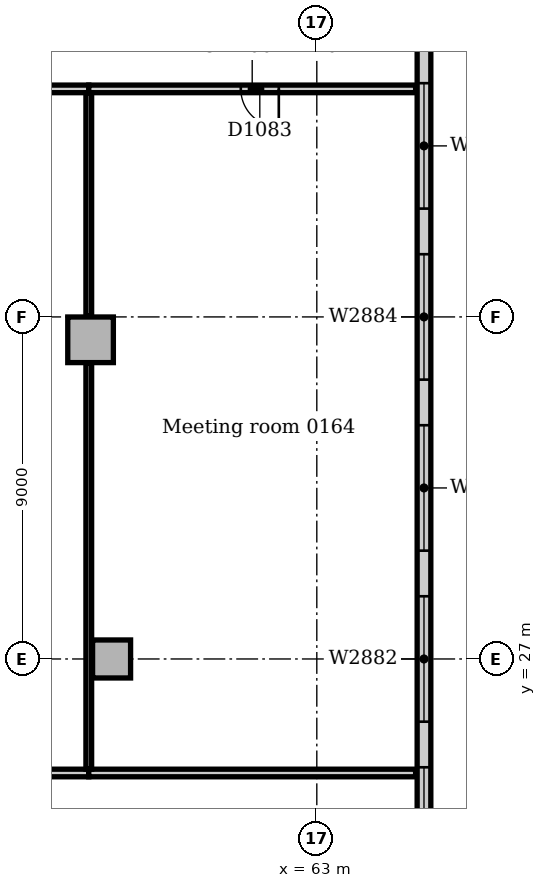
"""IFC4 building model, lengths in metres.
Left out: names, types, materials, properties, quantities, classifications, styles, units other than length and angle.
Written with IfcOpenShell. Run it as: python <this file> out.ifc"""

import sys

from ifc_helpers import new_model, si_unit, direction, frame, frame_2d, origin, origin_2d, place, context, subcontext, project, spatial, rectangle, extrude, element, fill, save


model = new_model("IFC4")
c1 = context("Model", 3, precision=1e-05, world=origin(), true_north=direction((0.0, 1.0)))
c2 = subcontext(c1, "Body", "Model", "MODEL_VIEW")
j1 = project(units=[si_unit("LENGTHUNIT", "METRE"), si_unit("PLANEANGLEUNIT", "RADIAN")], contexts=[c1])
p1 = place(None, origin())
s1 = spatial("IfcSite", under=j1, at=p1, CompositionType="ELEMENT")
p2 = place(p1, origin())
s2 = spatial("IfcBuilding", under=s1, at=p2, CompositionType="ELEMENT")
p3 = place(p2, frame((0.0, 0.0, 6.0)))
s3 = spatial("IfcBuildingStorey", under=s2, at=p3, CompositionType="ELEMENT", Elevation=6.0)
p4 = place(p3, frame((57.047, 35.398, 0.0), z_axis=(0.0, 0.0, 1.0), x_axis=(1.0, 0.0, 0.0)))
e1 = element("IfcColumn", 1, at=p4, inside=s3, PredefinedType="COLUMN", context=c2, shape_type="SweptSolid", body=[
    extrude(rectangle(XDim=1.2, YDim=1.2, at=origin_2d()), origin(), (0.0, 0.0, 1.0), 4.7),
])
p5 = place(p3, frame((57.6, 27.0, 0.0), z_axis=(0.0, 0.0, 1.0), x_axis=(1.0, 0.0, 0.0)))
e2 = element("IfcColumn", 2, at=p5, inside=s3, PredefinedType="COLUMN", context=c2, shape_type="SweptSolid", body=[
    extrude(rectangle(XDim=1.0, YDim=1.0, at=origin_2d()), origin(), (0.0, 0.0, 1.0), 4.7),
])
p6 = place(p3, frame((65.82, -9.0, 0.0), z_axis=(0.0, 0.0, 1.0), x_axis=(0.0, 1.0, 0.0)))
e3 = element("IfcWall", 3, at=p6, inside=s3, PredefinedType="STANDARD", context=c2, shape_type="SweptSolid", body=[
    extrude(rectangle(XDim=63.0, YDim=0.36, at=frame_2d((31.5, 0.0))), origin(), (0.0, 0.0, 1.0), 4.7),
])
p7 = place(p6, frame((2.85, 0.0, 0.9)))
e4 = element("IfcOpeningElement", 4, at=p7, cuts=e3, PredefinedType="OPENING", context=c2, shape_type="SweptSolid", body=[
    extrude(rectangle(XDim=3.3, YDim=2.4, at=frame_2d((1.65, 1.2))), frame((0.0, 0.19, 0.0), z_axis=(0.0, -1.0, 0.0), x_axis=(1.0, 0.0, 0.0)), (0.0, 0.0, 1.0), 0.38),
])
p8 = place(p6, frame((7.35, 0.0, 0.9)))
e5 = element("IfcOpeningElement", 5, at=p8, cuts=e3, PredefinedType="OPENING", context=c2, shape_type="SweptSolid", body=[
    extrude(rectangle(XDim=3.3, YDim=2.4, at=frame_2d((1.65, 1.2))), frame((0.0, 0.19, 0.0), z_axis=(0.0, -1.0, 0.0), x_axis=(1.0, 0.0, 0.0)), (0.0, 0.0, 1.0), 0.38),
])
p9 = place(p6, frame((11.85, 0.0, 0.9)))
e6 = element("IfcOpeningElement", 6, at=p9, cuts=e3, PredefinedType="OPENING", context=c2, shape_type="SweptSolid", body=[
    extrude(rectangle(XDim=3.3, YDim=2.4, at=frame_2d((1.65, 1.2))), frame((0.0, 0.19, 0.0), z_axis=(0.0, -1.0, 0.0), x_axis=(1.0, 0.0, 0.0)), (0.0, 0.0, 1.0), 0.38),
])
p10 = place(p6, frame((16.35, 0.0, 0.9)))
e7 = element("IfcOpeningElement", 7, at=p10, cuts=e3, PredefinedType="OPENING", context=c2, shape_type="SweptSolid", body=[
    extrude(rectangle(XDim=3.3, YDim=2.4, at=frame_2d((1.65, 1.2))), frame((0.0, 0.19, 0.0), z_axis=(0.0, -1.0, 0.0), x_axis=(1.0, 0.0, 0.0)), (0.0, 0.0, 1.0), 0.38),
])
p11 = place(p6, frame((20.85, 0.0, 0.9)))
e8 = element("IfcOpeningElement", 8, at=p11, cuts=e3, PredefinedType="OPENING", context=c2, shape_type="SweptSolid", body=[
    extrude(rectangle(XDim=3.3, YDim=2.4, at=frame_2d((1.65, 1.2))), frame((0.0, 0.19, 0.0), z_axis=(0.0, -1.0, 0.0), x_axis=(1.0, 0.0, 0.0)), (0.0, 0.0, 1.0), 0.38),
])
p12 = place(p6, frame((25.35, 0.0, 0.9)))
e9 = element("IfcOpeningElement", 9, at=p12, cuts=e3, PredefinedType="OPENING", context=c2, shape_type="SweptSolid", body=[
    extrude(rectangle(XDim=3.3, YDim=2.4, at=frame_2d((1.65, 1.2))), frame((0.0, 0.19, 0.0), z_axis=(0.0, -1.0, 0.0), x_axis=(1.0, 0.0, 0.0)), (0.0, 0.0, 1.0), 0.38),
])
p13 = place(p6, frame((29.85, 0.0, 0.9)))
e10 = element("IfcOpeningElement", 10, at=p13, cuts=e3, PredefinedType="OPENING", context=c2, shape_type="SweptSolid", body=[
    extrude(rectangle(XDim=3.3, YDim=2.4, at=frame_2d((1.65, 1.2))), frame((0.0, 0.19, 0.0), z_axis=(0.0, -1.0, 0.0), x_axis=(1.0, 0.0, 0.0)), (0.0, 0.0, 1.0), 0.38),
])
p14 = place(p6, frame((34.35, 0.0, 0.9)))
e11 = element("IfcOpeningElement", 11, at=p14, cuts=e3, PredefinedType="OPENING", context=c2, shape_type="SweptSolid", body=[
    extrude(rectangle(XDim=3.3, YDim=2.4, at=frame_2d((1.65, 1.2))), frame((0.0, 0.19, 0.0), z_axis=(0.0, -1.0, 0.0), x_axis=(1.0, 0.0, 0.0)), (0.0, 0.0, 1.0), 0.38),
])
p15 = place(p6, frame((38.85, 0.0, 0.9)))
e12 = element("IfcOpeningElement", 12, at=p15, cuts=e3, PredefinedType="OPENING", context=c2, shape_type="SweptSolid", body=[
    extrude(rectangle(XDim=3.3, YDim=2.4, at=frame_2d((1.65, 1.2))), frame((0.0, 0.19, 0.0), z_axis=(0.0, -1.0, 0.0), x_axis=(1.0, 0.0, 0.0)), (0.0, 0.0, 1.0), 0.38),
])
p16 = place(p6, frame((43.35, 0.0, 0.9)))
e13 = element("IfcOpeningElement", 13, at=p16, cuts=e3, PredefinedType="OPENING", context=c2, shape_type="SweptSolid", body=[
    extrude(rectangle(XDim=3.3, YDim=2.4, at=frame_2d((1.65, 1.2))), frame((0.0, 0.19, 0.0), z_axis=(0.0, -1.0, 0.0), x_axis=(1.0, 0.0, 0.0)), (0.0, 0.0, 1.0), 0.38),
])
p17 = place(p6, frame((47.85, 0.0, 0.9)))
e14 = element("IfcOpeningElement", 14, at=p17, cuts=e3, PredefinedType="OPENING", context=c2, shape_type="SweptSolid", body=[
    extrude(rectangle(XDim=3.3, YDim=2.4, at=frame_2d((1.65, 1.2))), frame((0.0, 0.19, 0.0), z_axis=(0.0, -1.0, 0.0), x_axis=(1.0, 0.0, 0.0)), (0.0, 0.0, 1.0), 0.38),
])
p18 = place(p6, frame((52.35, 0.0, 0.9)))
e15 = element("IfcOpeningElement", 15, at=p18, cuts=e3, PredefinedType="OPENING", context=c2, shape_type="SweptSolid", body=[
    extrude(rectangle(XDim=3.3, YDim=2.4, at=frame_2d((1.65, 1.2))), frame((0.0, 0.19, 0.0), z_axis=(0.0, -1.0, 0.0), x_axis=(1.0, 0.0, 0.0)), (0.0, 0.0, 1.0), 0.38),
])
p19 = place(p6, frame((56.85, 0.0, 0.9)))
e16 = element("IfcOpeningElement", 16, at=p19, cuts=e3, PredefinedType="OPENING", context=c2, shape_type="SweptSolid", body=[
    extrude(rectangle(XDim=3.3, YDim=2.4, at=frame_2d((1.65, 1.2))), frame((0.0, 0.19, 0.0), z_axis=(0.0, -1.0, 0.0), x_axis=(1.0, 0.0, 0.0)), (0.0, 0.0, 1.0), 0.38),
])
p20 = place(p3, frame((48.0, 42.0, 0.0), z_axis=(0.0, 0.0, 1.0), x_axis=(1.0, 0.0, 0.0)))
e17 = element("IfcWall", 17, at=p20, inside=s3, PredefinedType="PARTITIONING", context=c2, shape_type="SweptSolid", body=[
    extrude(rectangle(XDim=9.0, YDim=0.2, at=frame_2d((4.5, 0.0))), origin(), (0.0, 0.0, 1.0), 4.7),
])
p21 = place(p20, frame((4.0, 0.0, 0.0)))
e18 = element("IfcOpeningElement", 18, at=p21, cuts=e17, PredefinedType="OPENING", context=c2, shape_type="SweptSolid", body=[
    extrude(rectangle(XDim=1.0, YDim=2.1, at=frame_2d((0.5, 1.05))), frame((0.0, 0.11, 0.0), z_axis=(0.0, -1.0, 0.0), x_axis=(1.0, 0.0, 0.0)), (0.0, 0.0, 1.0), 0.22),
])
p22 = place(p3, frame((57.0, 42.0, 0.0), z_axis=(0.0, 0.0, 1.0), x_axis=(1.0, 0.0, 0.0)))
e19 = element("IfcWall", 19, at=p22, inside=s3, PredefinedType="PARTITIONING", context=c2, shape_type="SweptSolid", body=[
    extrude(rectangle(XDim=8.6, YDim=0.2, at=frame_2d((4.3, 0.0))), origin(), (0.0, 0.0, 1.0), 4.7),
])
p23 = place(p22, frame((4.0, 0.0, 0.0)))
e20 = element("IfcOpeningElement", 20, at=p23, cuts=e19, PredefinedType="OPENING", context=c2, shape_type="SweptSolid", body=[
    extrude(rectangle(XDim=1.0, YDim=2.1, at=frame_2d((0.5, 1.05))), frame((0.0, 0.11, 0.0), z_axis=(0.0, -1.0, 0.0), x_axis=(1.0, 0.0, 0.0)), (0.0, 0.0, 1.0), 0.22),
])
p24 = place(p3, frame((48.0, 24.0, 0.0), z_axis=(0.0, 0.0, 1.0), x_axis=(1.0, 0.0, 0.0)))
e21 = element("IfcWall", 21, at=p24, inside=s3, PredefinedType="PARTITIONING", context=c2, shape_type="SweptSolid", body=[
    extrude(rectangle(XDim=9.0, YDim=0.2, at=frame_2d((4.5, 0.0))), origin(), (0.0, 0.0, 1.0), 4.7),
])
p25 = place(p3, frame((57.0, 24.0, 0.0), z_axis=(0.0, 0.0, 1.0), x_axis=(1.0, 0.0, 0.0)))
e22 = element("IfcWall", 22, at=p25, inside=s3, PredefinedType="PARTITIONING", context=c2, shape_type="SweptSolid", body=[
    extrude(rectangle(XDim=8.6, YDim=0.2, at=frame_2d((4.3, 0.0))), origin(), (0.0, 0.0, 1.0), 4.7),
])
p26 = place(p3, frame((57.0, 24.1, 0.0), z_axis=(0.0, 0.0, 1.0), x_axis=(0.0, 1.0, 0.0)))
e23 = element("IfcWall", 23, at=p26, inside=s3, PredefinedType="PARTITIONING", context=c2, shape_type="SweptSolid", body=[
    extrude(rectangle(XDim=10.678, YDim=0.15, at=frame_2d((5.339, 0.0))), origin(), (0.0, 0.0, 1.0), 4.7),
])
p27 = place(p3, frame((57.0, 36.018, 0.0), z_axis=(0.0, 0.0, 1.0), x_axis=(0.0, 1.0, 0.0)))
e24 = element("IfcWall", 24, at=p27, inside=s3, PredefinedType="PARTITIONING", context=c2, shape_type="SweptSolid", body=[
    extrude(rectangle(XDim=5.882, YDim=0.15, at=frame_2d((2.941, 0.0))), origin(), (0.0, 0.0, 1.0), 4.7),
])
p28 = place(p13, origin())
e25 = element("IfcWindow", 25, at=p28, inside=s3, PartitioningType="SINGLE_PANEL", PredefinedType="WINDOW", context=c2, shape_type="SweptSolid", body=[
    extrude(rectangle(XDim=3.3, YDim=2.4, at=frame_2d((1.65, 1.2))), frame((0.0, 0.13, 0.0), z_axis=(0.0, -1.0, 0.0), x_axis=(1.0, 0.0, 0.0)), (0.0, 0.0, 1.0), 0.06),
])
fill(e10, e25)
p29 = place(p14, origin())
e26 = element("IfcWindow", 26, at=p29, inside=s3, PartitioningType="SINGLE_PANEL", PredefinedType="WINDOW", context=c2, shape_type="SweptSolid", body=[
    extrude(rectangle(XDim=3.3, YDim=2.4, at=frame_2d((1.65, 1.2))), frame((0.0, 0.13, 0.0), z_axis=(0.0, -1.0, 0.0), x_axis=(1.0, 0.0, 0.0)), (0.0, 0.0, 1.0), 0.06),
])
fill(e11, e26)
p30 = place(p15, origin())
e27 = element("IfcWindow", 27, at=p30, inside=s3, PartitioningType="SINGLE_PANEL", PredefinedType="WINDOW", context=c2, shape_type="SweptSolid", body=[
    extrude(rectangle(XDim=3.3, YDim=2.4, at=frame_2d((1.65, 1.2))), frame((0.0, 0.13, 0.0), z_axis=(0.0, -1.0, 0.0), x_axis=(1.0, 0.0, 0.0)), (0.0, 0.0, 1.0), 0.06),
])
fill(e12, e27)
p31 = place(p16, origin())
e28 = element("IfcWindow", 28, at=p31, inside=s3, PartitioningType="SINGLE_PANEL", PredefinedType="WINDOW", context=c2, shape_type="SweptSolid", body=[
    extrude(rectangle(XDim=3.3, YDim=2.4, at=frame_2d((1.65, 1.2))), frame((0.0, 0.13, 0.0), z_axis=(0.0, -1.0, 0.0), x_axis=(1.0, 0.0, 0.0)), (0.0, 0.0, 1.0), 0.06),
])
fill(e13, e28)
p32 = place(p17, origin())
e29 = element("IfcWindow", 29, at=p32, inside=s3, PartitioningType="SINGLE_PANEL", PredefinedType="WINDOW", context=c2, shape_type="SweptSolid", body=[
    extrude(rectangle(XDim=3.3, YDim=2.4, at=frame_2d((1.65, 1.2))), frame((0.0, 0.13, 0.0), z_axis=(0.0, -1.0, 0.0), x_axis=(1.0, 0.0, 0.0)), (0.0, 0.0, 1.0), 0.06),
])
fill(e14, e29)
p33 = place(p23, frame((1.0, 0.0, 0.0), z_axis=(0.0, 0.0, 1.0), x_axis=(-1.0, 0.0, 0.0)))
e30 = element("IfcDoor", 30, at=p33, inside=s3, OperationType="SINGLE_SWING_LEFT", PredefinedType="DOOR", context=c2, shape_type="SweptSolid", body=[
    extrude(rectangle(XDim=1.0, YDim=2.1, at=frame_2d((0.5, 1.05))), frame((0.0, 0.025, 0.0), z_axis=(0.0, -1.0, 0.0), x_axis=(1.0, 0.0, 0.0)), (0.0, 0.0, 1.0), 0.05),
])
fill(e20, e30)
save(model, sys.argv[1])
